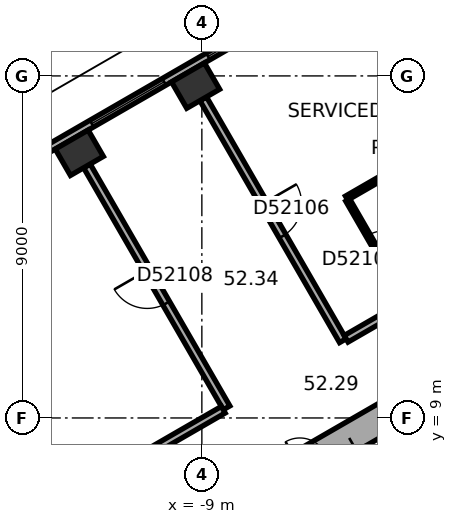
"""IFC4 building model, lengths in metres.
Left out: names, types, materials, properties, quantities, classifications, styles, units other than length and angle.
Written with IfcOpenShell. Run it as: python <this file> out.ifc"""

import sys

from ifc_helpers import new_model, si_unit, direction, frame, frame_2d, origin, origin_2d, place, context, subcontext, project, spatial, rectangle, extrude, element, fill, save


model = new_model("IFC4")
c1 = context("Model", 3, precision=1e-05, world=origin(), true_north=direction((0.0, 1.0)))
c2 = subcontext(c1, "Body", "Model", "MODEL_VIEW")
j1 = project(units=[si_unit("LENGTHUNIT", "METRE"), si_unit("PLANEANGLEUNIT", "RADIAN")], contexts=[c1])
p1 = place(None, origin())
s1 = spatial("IfcSite", under=j1, at=p1, CompositionType="ELEMENT")
p2 = place(p1, origin())
s2 = spatial("IfcBuilding", under=s1, at=p2, CompositionType="ELEMENT")
p3 = place(p2, frame((0.0, 0.0, 210.6)))
s3 = spatial("IfcBuildingStorey", under=s2, at=p3, CompositionType="ELEMENT", Elevation=210.6)
for number, where, z_axis, x_axis in (
    (1, (-9.165, 17.745, 0.0), (0.0, 0.0, 1.0), (-0.866, -0.5, 0.0)),
    (2, (-12.225, 15.978, 0.0), (0.0, 0.0, 1.0), (-0.866, -0.5, 0.0)),
):
    element("IfcColumn", number, at=place(p3, frame(where, z_axis=z_axis, x_axis=x_axis)), inside=s3, PredefinedType="COLUMN", context=c2, shape_type="SweptSolid", body=[
        extrude(rectangle(XDim=1.0, YDim=0.8, at=origin_2d()), origin(), (0.0, 0.0, 1.0), 3.7),
    ])
p4 = place(p3, frame((0.2, 11.547, 0.0), z_axis=(0.0, 0.0, 1.0), x_axis=(-0.866023897231, -0.500002609418, 0.0)))
e3 = element("IfcWall", 3, at=p4, inside=s3, PredefinedType="SHEAR", context=c2, shape_type="SweptSolid", body=[
    extrude(rectangle(XDim=11.894, YDim=0.8, at=frame_2d((5.947, 0.0))), origin(), (0.0, 0.0, 1.0), 3.7),
])
p5 = place(p4, frame((6.147, 0.0, 0.0)))
e4 = element("IfcOpeningElement", 4, at=p5, cuts=e3, PredefinedType="OPENING", context=c2, shape_type="SweptSolid", body=[
    extrude(rectangle(XDim=1.5, YDim=2.1, at=frame_2d((0.75, 1.05))), frame((0.0, 0.41, 0.0), z_axis=(0.0, -1.0, 0.0), x_axis=(1.0, 0.0, 0.0)), (0.0, 0.0, 1.0), 0.82),
])
p6 = place(p4, frame((2.997, 0.0, 0.0)))
e5 = element("IfcOpeningElement", 5, at=p6, cuts=e3, PredefinedType="OPENING", context=c2, shape_type="SweptSolid", body=[
    extrude(rectangle(XDim=0.9, YDim=2.1, at=frame_2d((0.45, 1.05))), frame((0.0, 0.41, 0.0), z_axis=(0.0, -1.0, 0.0), x_axis=(1.0, 0.0, 0.0)), (0.0, 0.0, 1.0), 0.82),
])
p7 = place(p3, frame((-2.786, 22.005, 0.0), z_axis=(0.0, 0.0, 1.0), x_axis=(-0.866026555358, -0.49999800541, 0.0)))
e6 = element("IfcWall", 6, at=p7, inside=s3, PredefinedType="STANDARD", context=c2, shape_type="SweptSolid", body=[
    extrude(rectangle(XDim=18.841, YDim=0.2, at=frame_2d((9.421, 0.0))), origin(), (0.0, 0.0, 1.0), 3.7),
])
p8 = place(p7, frame((1.254, 0.0, 0.9)))
e7 = element("IfcOpeningElement", 7, at=p8, cuts=e6, PredefinedType="OPENING", context=c2, shape_type="SweptSolid", body=[
    extrude(rectangle(XDim=2.2, YDim=2.0, at=frame_2d((1.1, 1.0))), frame((0.0, 0.11, 0.0), z_axis=(0.0, -1.0, 0.0), x_axis=(1.0, 0.0, 0.0)), (0.0, 0.0, 1.0), 0.22),
])
p9 = place(p7, frame((4.788, 0.0, 0.9)))
e8 = element("IfcOpeningElement", 8, at=p9, cuts=e6, PredefinedType="OPENING", context=c2, shape_type="SweptSolid", body=[
    extrude(rectangle(XDim=2.2, YDim=2.0, at=frame_2d((1.1, 1.0))), frame((0.0, 0.11, 0.0), z_axis=(0.0, -1.0, 0.0), x_axis=(1.0, 0.0, 0.0)), (0.0, 0.0, 1.0), 0.22),
])
p10 = place(p7, frame((8.321, 0.0, 0.9)))
e9 = element("IfcOpeningElement", 9, at=p10, cuts=e6, PredefinedType="OPENING", context=c2, shape_type="SweptSolid", body=[
    extrude(rectangle(XDim=2.2, YDim=2.0, at=frame_2d((1.1, 1.0))), frame((0.0, 0.11, 0.0), z_axis=(0.0, -1.0, 0.0), x_axis=(1.0, 0.0, 0.0)), (0.0, 0.0, 1.0), 0.22),
])
p11 = place(p7, frame((11.855, 0.0, 0.9)))
e10 = element("IfcOpeningElement", 10, at=p11, cuts=e6, PredefinedType="OPENING", context=c2, shape_type="SweptSolid", body=[
    extrude(rectangle(XDim=2.2, YDim=2.0, at=frame_2d((1.1, 1.0))), frame((0.0, 0.11, 0.0), z_axis=(0.0, -1.0, 0.0), x_axis=(1.0, 0.0, 0.0)), (0.0, 0.0, 1.0), 0.22),
])
p12 = place(p7, frame((15.389, 0.0, 0.9)))
e11 = element("IfcOpeningElement", 11, at=p12, cuts=e6, PredefinedType="OPENING", context=c2, shape_type="SweptSolid", body=[
    extrude(rectangle(XDim=2.2, YDim=2.0, at=frame_2d((1.1, 1.0))), frame((0.0, 0.11, 0.0), z_axis=(0.0, -1.0, 0.0), x_axis=(1.0, 0.0, 0.0)), (0.0, 0.0, 1.0), 0.22),
])
p13 = place(p3, frame((-12.025, 15.632, 0.0), z_axis=(0.0, 0.0, 1.0), x_axis=(0.499983153418, -0.866035129944, 0.0)))
e12 = element("IfcWall", 12, at=p13, inside=s3, PredefinedType="PARTITIONING", context=c2, shape_type="SweptSolid", body=[
    extrude(rectangle(XDim=7.35, YDim=0.2, at=frame_2d((3.675, 0.0))), origin(), (0.0, 0.0, 1.0), 3.35),
])
p14 = place(p13, frame((3.175, 0.0, 0.0)))
e13 = element("IfcOpeningElement", 13, at=p14, cuts=e12, PredefinedType="OPENING", context=c2, shape_type="SweptSolid", body=[
    extrude(rectangle(XDim=1.0, YDim=2.1, at=frame_2d((0.5, 1.05))), frame((0.0, 0.11, 0.0), z_axis=(0.0, -1.0, 0.0), x_axis=(1.0, 0.0, 0.0)), (0.0, 0.0, 1.0), 0.22),
])
p15 = place(p3, frame((-8.965, 17.399, 0.0), z_axis=(0.0, 0.0, 1.0), x_axis=(0.499993683172, -0.866029050776, 0.0)))
e14 = element("IfcWall", 14, at=p15, inside=s3, PredefinedType="PARTITIONING", context=c2, shape_type="SweptSolid", body=[
    extrude(rectangle(XDim=7.35, YDim=0.2, at=frame_2d((3.675, 0.0))), origin(), (0.0, 0.0, 1.0), 2.65),
])
p16 = place(p15, frame((3.175, 0.0, 0.0)))
e15 = element("IfcOpeningElement", 15, at=p16, cuts=e14, PredefinedType="OPENING", context=c2, shape_type="SweptSolid", body=[
    extrude(rectangle(XDim=1.0, YDim=2.1, at=frame_2d((0.5, 1.05))), frame((0.0, 0.11, 0.0), z_axis=(0.0, -1.0, 0.0), x_axis=(1.0, 0.0, 0.0)), (0.0, 0.0, 1.0), 0.22),
])
p17 = place(p3, frame((-8.437, 9.217, 0.0), z_axis=(0.0, 0.0, 1.0), x_axis=(-0.866005660673, -0.500034194513, 0.0)))
e16 = element("IfcWall", 16, at=p17, inside=s3, PredefinedType="PARTITIONING", context=c2, shape_type="SweptSolid", body=[
    extrude(rectangle(XDim=3.209, YDim=0.2, at=frame_2d((1.604, 0.0))), origin(), (0.0, 0.0, 1.0), 3.35),
])
p18 = place(p3, frame((-5.191, 14.785, 0.0), z_axis=(0.0, 0.0, 1.0), x_axis=(0.866034573852, 0.49998411664, 0.0)))
e17 = element("IfcWall", 17, at=p18, inside=s3, PredefinedType="PARTITIONING", context=c2, shape_type="SweptSolid", body=[
    extrude(rectangle(XDim=2.8, YDim=0.12, at=frame_2d((1.4, 0.0))), origin(), (0.0, 0.0, 1.0), 3.35),
])
p19 = place(p3, frame((-3.641, 12.101, 0.0), z_axis=(0.0, 0.0, 1.0), x_axis=(-0.500026023896, 0.86601037836, 0.0)))
e18 = element("IfcWall", 18, at=p19, inside=s3, PredefinedType="PARTITIONING", context=c2, shape_type="SweptSolid", body=[
    extrude(rectangle(XDim=3.04, YDim=0.12, at=frame_2d((1.52, 0.0))), origin(), (0.0, 0.0, 1.0), 3.35),
])
p20 = place(p19, frame((1.07, 0.0, 0.0)))
e19 = element("IfcOpeningElement", 19, at=p20, cuts=e18, PredefinedType="OPENING", context=c2, shape_type="SweptSolid", body=[
    extrude(rectangle(XDim=0.9, YDim=2.1, at=frame_2d((0.45, 1.05))), frame((0.0, 0.07, 0.0), z_axis=(0.0, -1.0, 0.0), x_axis=(1.0, 0.0, 0.0)), (0.0, 0.0, 1.0), 0.14),
])
p21 = place(p3, frame((-1.167, 13.414, 0.0), z_axis=(0.0, 0.0, 1.0), x_axis=(-0.866023347809, -0.500003561037, 0.0)))
e20 = element("IfcWall", 20, at=p21, inside=s3, PredefinedType="PARTITIONING", context=c2, shape_type="SweptSolid", body=[
    extrude(rectangle(XDim=4.661, YDim=0.2, at=frame_2d((2.331, 0.0))), origin(), (0.0, 0.0, 1.0), 3.35),
])
p22 = place(p9, origin())
e21 = element("IfcWindow", 21, at=p22, inside=s3, PartitioningType="SINGLE_PANEL", PredefinedType="WINDOW", context=c2, shape_type="SweptSolid", body=[
    extrude(rectangle(XDim=2.2, YDim=2.0, at=frame_2d((1.1, 1.0))), frame((0.0, 0.03, 0.0), z_axis=(0.0, -1.0, 0.0), x_axis=(1.0, 0.0, 0.0)), (0.0, 0.0, 1.0), 0.06),
])
fill(e8, e21)
p23 = place(p10, origin())
e22 = element("IfcWindow", 22, at=p23, inside=s3, PartitioningType="SINGLE_PANEL", PredefinedType="WINDOW", context=c2, shape_type="SweptSolid", body=[
    extrude(rectangle(XDim=2.2, YDim=2.0, at=frame_2d((1.1, 1.0))), frame((0.0, 0.03, 0.0), z_axis=(0.0, -1.0, 0.0), x_axis=(1.0, 0.0, 0.0)), (0.0, 0.0, 1.0), 0.06),
])
fill(e9, e22)
p24 = place(p5, origin())
e23 = element("IfcDoor", 23, at=p24, inside=s3, OperationType="DOUBLE_DOOR_SINGLE_SWING", PredefinedType="DOOR", context=c2, shape_type="SweptSolid", body=[
    extrude(rectangle(XDim=1.5, YDim=2.1, at=frame_2d((0.75, 1.05))), frame((0.0, 0.025, 0.0), z_axis=(0.0, -1.0, 0.0), x_axis=(1.0, 0.0, 0.0)), (0.0, 0.0, 1.0), 0.05),
])
fill(e4, e23)
p25 = place(p16, origin())
e24 = element("IfcDoor", 24, at=p25, inside=s3, OperationType="SINGLE_SWING_LEFT", PredefinedType="DOOR", context=c2, shape_type="SweptSolid", body=[
    extrude(rectangle(XDim=1.0, YDim=2.1, at=frame_2d((0.5, 1.05))), frame((0.0, 0.025, 0.0), z_axis=(0.0, -1.0, 0.0), x_axis=(1.0, 0.0, 0.0)), (0.0, 0.0, 1.0), 0.05),
])
fill(e15, e24)
p26 = place(p20, origin())
e25 = element("IfcDoor", 25, at=p26, inside=s3, OperationType="SINGLE_SWING_LEFT", PredefinedType="DOOR", context=c2, shape_type="SweptSolid", body=[
    extrude(rectangle(XDim=0.9, YDim=2.1, at=frame_2d((0.45, 1.05))), frame((0.0, 0.025, 0.0), z_axis=(0.0, -1.0, 0.0), x_axis=(1.0, 0.0, 0.0)), (0.0, 0.0, 1.0), 0.05),
])
fill(e19, e25)
p27 = place(p14, origin())
e26 = element("IfcDoor", 26, at=p27, inside=s3, OperationType="SINGLE_SWING_LEFT", PredefinedType="DOOR", context=c2, shape_type="SweptSolid", body=[
    extrude(rectangle(XDim=1.0, YDim=2.1, at=frame_2d((0.5, 1.05))), frame((0.0, 0.025, 0.0), z_axis=(0.0, -1.0, 0.0), x_axis=(1.0, 0.0, 0.0)), (0.0, 0.0, 1.0), 0.05),
])
fill(e13, e26)
save(model, sys.argv[1])
